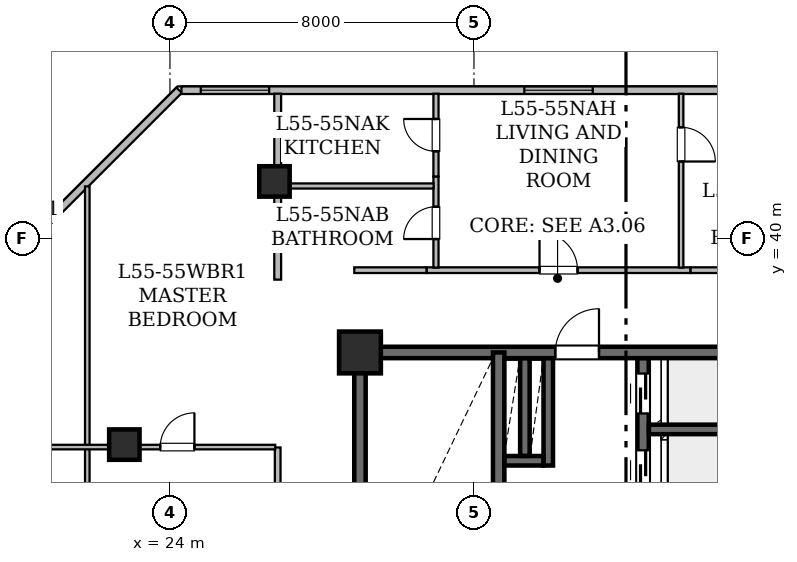
"""IFC4 building model, lengths in metres.
Left out: names, types, materials, properties, quantities, classifications, styles, units other than length and angle.
Written with IfcOpenShell. Run it as: python <this file> out.ifc"""

import sys

from ifc_helpers import new_model, si_unit, direction, frame, frame_2d, origin, origin_2d, place, context, subcontext, project, spatial, rectangle, hollow_rectangle, extrude, element, fill, save


model = new_model("IFC4")
c1 = context("Model", 3, precision=1e-05, world=origin(), true_north=direction((0.0, 1.0)))
c2 = subcontext(c1, "Body", "Model", "MODEL_VIEW")
j1 = project(units=[si_unit("LENGTHUNIT", "METRE"), si_unit("PLANEANGLEUNIT", "RADIAN")], contexts=[c1])
p1 = place(None, origin())
s1 = spatial("IfcSite", under=j1, at=p1, CompositionType="ELEMENT")
p2 = place(p1, origin())
s2 = spatial("IfcBuilding", under=s1, at=p2, CompositionType="ELEMENT")
p3 = place(p2, frame((0.0, 0.0, 217.2)))
s3 = spatial("IfcBuildingStorey", under=s2, at=p3, CompositionType="ELEMENT", Elevation=217.2)
p4 = place(p3, frame((29.0, 37.0, 0.0), z_axis=(0.0, 0.0, 1.0), x_axis=(1.0, 0.0, 0.0)))
e1 = element("IfcColumn", 1, at=p4, inside=s3, PredefinedType="COLUMN", context=c2, shape_type="SweptSolid", body=[
    extrude(hollow_rectangle(XDim=1.1, YDim=1.1, WallThickness=0.055, at=origin_2d()), origin(), (0.0, 0.0, 1.0), 3.65),
])
for number, where, z_axis, x_axis in (
    (2, (26.75, 41.5, 0.025), (0.0, 0.0, 1.0), (1.0, 0.0, 0.0)),
    (3, (22.8, 34.575, 0.025), (0.0, 0.0, 1.0), (1.0, 0.0, 0.0)),
):
    element("IfcColumn", number, at=place(p3, frame(where, z_axis=z_axis, x_axis=x_axis)), inside=s3, PredefinedType="COLUMN", context=c2, shape_type="SweptSolid", body=[
        extrude(hollow_rectangle(XDim=0.8, YDim=0.8, WallThickness=0.04, at=origin_2d()), origin(), (0.0, 0.0, 1.0), 3.625),
    ])
p5 = place(p3, frame((20.344, 40.003, 0.0), z_axis=(0.0, 0.0, 1.0), x_axis=(0.707106781187, 0.707106781187, 0.0)))
e4 = element("IfcWall", 4, at=p5, inside=s3, PredefinedType="STANDARD", context=c2, shape_type="SweptSolid", body=[
    extrude(rectangle(XDim=5.511, YDim=0.2, at=frame_2d((2.756, 0.0))), origin(), (0.0, 0.0, 1.0), 3.43),
])
p6 = place(p3, frame((24.302, 43.9, 0.0), z_axis=(0.0, 0.0, 1.0), x_axis=(1.0, 0.0, 0.0)))
e5 = element("IfcWall", 5, at=p6, inside=s3, PredefinedType="STANDARD", context=c2, shape_type="SweptSolid", body=[
    extrude(rectangle(XDim=41.457, YDim=0.2, at=frame_2d((20.729, 0.0))), origin(), (0.0, 0.0, 1.0), 3.43),
])
p7 = place(p6, frame((0.509, 0.0, 0.85)))
e6 = element("IfcOpeningElement", 6, at=p7, cuts=e5, PredefinedType="OPENING", context=c2, shape_type="SweptSolid", body=[
    extrude(rectangle(XDim=1.8, YDim=0.92, at=frame_2d((0.9, 0.46))), frame((0.0, 0.11, 0.0), z_axis=(0.0, -1.0, 0.0), x_axis=(1.0, 0.0, 0.0)), (0.0, 0.0, 1.0), 0.22),
])
p8 = place(p6, frame((9.023, 0.0, 0.85)))
e7 = element("IfcOpeningElement", 7, at=p8, cuts=e5, PredefinedType="OPENING", context=c2, shape_type="SweptSolid", body=[
    extrude(rectangle(XDim=1.8, YDim=0.92, at=frame_2d((0.9, 0.46))), frame((0.0, 0.11, 0.0), z_axis=(0.0, -1.0, 0.0), x_axis=(1.0, 0.0, 0.0)), (0.0, 0.0, 1.0), 0.22),
])
p9 = place(p6, frame((14.33, 0.0, 0.85)))
e8 = element("IfcOpeningElement", 8, at=p9, cuts=e5, PredefinedType="OPENING", context=c2, shape_type="SweptSolid", body=[
    extrude(rectangle(XDim=1.8, YDim=0.92, at=frame_2d((0.9, 0.46))), frame((0.0, 0.11, 0.0), z_axis=(0.0, -1.0, 0.0), x_axis=(1.0, 0.0, 0.0)), (0.0, 0.0, 1.0), 0.22),
])
p10 = place(p6, frame((30.783, 0.0, 0.78)))
e9 = element("IfcOpeningElement", 9, at=p10, cuts=e5, PredefinedType="OPENING", context=c2, shape_type="SweptSolid", body=[
    extrude(rectangle(XDim=1.2, YDim=1.5, at=frame_2d((0.6, 0.75))), frame((0.0, 0.11, 0.0), z_axis=(0.0, -1.0, 0.0), x_axis=(1.0, 0.0, 0.0)), (0.0, 0.0, 1.0), 0.22),
])
p11 = place(p6, frame((23.056, 0.0, 0.85)))
e10 = element("IfcOpeningElement", 10, at=p11, cuts=e5, PredefinedType="OPENING", context=c2, shape_type="SweptSolid", body=[
    extrude(rectangle(XDim=1.8, YDim=0.92, at=frame_2d((0.9, 0.46))), frame((0.0, 0.11, 0.0), z_axis=(0.0, -1.0, 0.0), x_axis=(1.0, 0.0, 0.0)), (0.0, 0.0, 1.0), 0.22),
])
p12 = place(p6, frame((35.52, 0.0, 0.85)))
e11 = element("IfcOpeningElement", 11, at=p12, cuts=e5, PredefinedType="OPENING", context=c2, shape_type="SweptSolid", body=[
    extrude(rectangle(XDim=1.8, YDim=0.92, at=frame_2d((0.9, 0.46))), frame((0.0, 0.11, 0.0), z_axis=(0.0, -1.0, 0.0), x_axis=(1.0, 0.0, 0.0)), (0.0, 0.0, 1.0), 0.22),
])
p13 = place(p3, frame((29.0, 28.0, 0.0), z_axis=(0.0, 0.0, 1.0), x_axis=(0.0, 1.0, 0.0)))
e12 = element("IfcWall", 12, at=p13, inside=s3, PredefinedType="SHEAR", context=c2, shape_type="SweptSolid", body=[
    extrude(rectangle(XDim=9.0, YDim=0.3, at=frame_2d((4.5, 0.0))), origin(), (0.0, 0.0, 1.0), 3.43),
])
p14 = place(p3, frame((29.0, 37.0, 0.0), z_axis=(0.0, 0.0, 1.0), x_axis=(1.0, 0.0, 0.0)))
e13 = element("IfcWall", 13, at=p14, inside=s3, PredefinedType="SHEAR", context=c2, shape_type="SweptSolid", body=[
    extrude(rectangle(XDim=10.4, YDim=0.3, at=frame_2d((5.2, 0.0))), origin(), (0.0, 0.0, 1.0), 3.43),
])
p15 = place(p14, frame((5.14, 0.0, 0.0)))
e14 = element("IfcOpeningElement", 14, at=p15, cuts=e13, PredefinedType="OPENING", context=c2, shape_type="SweptSolid", body=[
    extrude(rectangle(XDim=1.15, YDim=2.2, at=frame_2d((0.575, 1.1))), frame((0.0, 0.16, 0.0), z_axis=(0.0, -1.0, 0.0), x_axis=(1.0, 0.0, 0.0)), (0.0, 0.0, 1.0), 0.32),
])
p16 = place(p3, frame((32.65, 28.0, 0.0), z_axis=(0.0, 0.0, 1.0), x_axis=(0.0, 1.0, 0.0)))
e15 = element("IfcWall", 15, at=p16, inside=s3, PredefinedType="SHEAR", context=c2, shape_type="SweptSolid", body=[
    extrude(rectangle(XDim=9.0, YDim=0.3, at=frame_2d((4.5, 0.0))), origin(), (0.0, 0.0, 1.0), 3.43),
])
p17 = place(p16, frame((0.72, 0.0, 0.0)))
e16 = element("IfcOpeningElement", 16, at=p17, cuts=e15, PredefinedType="OPENING", context=c2, shape_type="SweptSolid", body=[
    extrude(rectangle(XDim=1.0, YDim=2.15, at=frame_2d((0.5, 1.075))), frame((0.0, 0.16, 0.0), z_axis=(0.0, -1.0, 0.0), x_axis=(1.0, 0.0, 0.0)), (0.0, 0.0, 1.0), 0.32),
])
p18 = place(p3, frame((36.45, 31.3, 0.0), z_axis=(0.0, 0.0, 1.0), x_axis=(0.0, 1.0, 0.0)))
e17 = element("IfcWall", 17, at=p18, inside=s3, PredefinedType="SHEAR", context=c2, shape_type="SweptSolid", body=[
    extrude(rectangle(XDim=5.546, YDim=0.3, at=frame_2d((2.773, 0.0))), origin(), (0.0, 0.0, 1.0), 3.43),
])
p19 = place(p18, frame((0.12, 0.0, 0.0)))
e18 = element("IfcOpeningElement", 18, at=p19, cuts=e17, PredefinedType="OPENING", context=c2, shape_type="SweptSolid", body=[
    extrude(rectangle(XDim=1.05, YDim=2.15, at=frame_2d((0.525, 1.075))), frame((0.0, 0.16, 0.0), z_axis=(0.0, -1.0, 0.0), x_axis=(1.0, 0.0, 0.0)), (0.0, 0.0, 1.0), 0.32),
])
p20 = place(p18, frame((2.075, 0.0, 0.0)))
e19 = element("IfcOpeningElement", 19, at=p20, cuts=e17, PredefinedType="OPENING", context=c2, shape_type="SweptSolid", body=[
    extrude(rectangle(XDim=1.05, YDim=2.15, at=frame_2d((0.525, 1.075))), frame((0.0, 0.16, 0.0), z_axis=(0.0, -1.0, 0.0), x_axis=(1.0, 0.0, 0.0)), (0.0, 0.0, 1.0), 0.32),
])
p21 = place(p18, frame((4.095, 0.0, 0.0)))
e20 = element("IfcOpeningElement", 20, at=p21, cuts=e17, PredefinedType="OPENING", context=c2, shape_type="SweptSolid", body=[
    extrude(rectangle(XDim=1.05, YDim=2.15, at=frame_2d((0.525, 1.075))), frame((0.0, 0.16, 0.0), z_axis=(0.0, -1.0, 0.0), x_axis=(1.0, 0.0, 0.0)), (0.0, 0.0, 1.0), 0.32),
])
p22 = place(p3, frame((36.604, 34.975, 0.0), z_axis=(0.0, 0.0, 1.0), x_axis=(1.0, 0.0, 0.0)))
e21 = element("IfcWall", 21, at=p22, inside=s3, PredefinedType="SHEAR", context=c2, shape_type="SweptSolid", body=[
    extrude(rectangle(XDim=2.642, YDim=0.25, at=frame_2d((1.321, 0.0))), origin(), (0.0, 0.0, 1.0), 3.43),
])
p23 = place(p3, frame((33.955, 34.025, 0.0), z_axis=(0.0, 0.0, 1.0), x_axis=(0.0, 1.0, 0.0)))
e22 = element("IfcWall", 22, at=p23, inside=s3, PredefinedType="SHEAR", context=c2, shape_type="SweptSolid", body=[
    extrude(rectangle(XDim=2.821, YDim=0.25, at=frame_2d((1.411, 0.0))), origin(), (0.0, 0.0, 1.0), 3.43),
])
p24 = place(p3, frame((32.804, 34.15, 0.0), z_axis=(0.0, 0.0, 1.0), x_axis=(1.0, 0.0, 0.0)))
e23 = element("IfcWall", 23, at=p24, inside=s3, PredefinedType="SHEAR", context=c2, shape_type="SweptSolid", body=[
    extrude(rectangle(XDim=1.022, YDim=0.25, at=frame_2d((0.511, 0.0))), origin(), (0.0, 0.0, 1.0), 3.43),
])
p25 = place(p3, frame((33.34, 34.279, 0.0), z_axis=(0.0, 0.0, 1.0), x_axis=(0.0, 1.0, 0.0)))
e24 = element("IfcWall", 24, at=p25, inside=s3, PredefinedType="SHEAR", context=c2, shape_type="SweptSolid", body=[
    extrude(rectangle(XDim=2.567, YDim=0.25, at=frame_2d((1.283, 0.0))), origin(), (0.0, 0.0, 1.0), 3.43),
])
p26 = place(p3, frame((26.835, 32.681, 0.0), z_axis=(0.0, 0.0, 1.0), x_axis=(0.0, 1.0, 0.0)))
e25 = element("IfcWall", 25, at=p26, inside=s3, PredefinedType="STANDARD", context=c2, shape_type="SweptSolid", body=[
    extrude(rectangle(XDim=1.819, YDim=0.15, at=frame_2d((0.91, 0.0))), origin(), (0.0, 0.0, 1.0), 3.065),
])
p27 = place(p3, frame((30.751, 39.165, 0.0), z_axis=(0.0, 0.0, 1.0), x_axis=(1.0, 0.0, 0.0)))
e26 = element("IfcWall", 26, at=p27, inside=s3, PredefinedType="STANDARD", context=c2, shape_type="SweptSolid", body=[
    extrude(rectangle(XDim=6.948, YDim=0.15, at=frame_2d((3.474, 0.0))), origin(), (0.0, 0.0, 1.0), 3.43),
])
p28 = place(p27, frame((2.974, 0.0, 0.0)))
e27 = element("IfcOpeningElement", 27, at=p28, cuts=e26, PredefinedType="OPENING", context=c2, shape_type="SweptSolid", body=[
    extrude(rectangle(XDim=1.0, YDim=2.15, at=frame_2d((0.5, 1.075))), frame((0.0, 0.085, 0.0), z_axis=(0.0, -1.0, 0.0), x_axis=(1.0, 0.0, 0.0)), (0.0, 0.0, 1.0), 0.17),
])
p29 = place(p3, frame((28.85, 39.165, 0.0), z_axis=(0.0, 0.0, 1.0), x_axis=(1.0, 0.0, 0.0)))
e28 = element("IfcWall", 28, at=p29, inside=s3, PredefinedType="STANDARD", context=c2, shape_type="SweptSolid", body=[
    extrude(rectangle(XDim=1.901, YDim=0.15, at=frame_2d((0.95, 0.0))), origin(), (0.0, 0.0, 1.0), 3.43),
])
p30 = place(p3, frame((37.699, 39.165, 0.0), z_axis=(0.0, 0.0, 1.0), x_axis=(1.0, 0.0, 0.0)))
e29 = element("IfcWall", 29, at=p30, inside=s3, PredefinedType="STANDARD", context=c2, shape_type="SweptSolid", body=[
    extrude(rectangle(XDim=3.851, YDim=0.15, at=frame_2d((1.926, 0.0))), origin(), (0.0, 0.0, 1.0), 2.725),
])
p31 = place(p3, frame((21.825, 41.369, 0.0), z_axis=(0.0, 0.0, 1.0), x_axis=(0.0, -1.0, 0.0)))
e30 = element("IfcWall", 30, at=p31, inside=s3, PredefinedType="PARTITIONING", context=c2, shape_type="SweptSolid", body=[
    extrude(rectangle(XDim=9.524, YDim=0.12, at=frame_2d((4.762, 0.0))), origin(), (0.0, 0.0, 1.0), 3.43),
])
p32 = place(p3, frame((20.392, 34.51, 0.0), z_axis=(0.0, 0.0, 1.0), x_axis=(1.0, 0.0, 0.0)))
e31 = element("IfcWall", 31, at=p32, inside=s3, PredefinedType="PARTITIONING", context=c2, shape_type="SweptSolid", body=[
    extrude(rectangle(XDim=6.378, YDim=0.12, at=frame_2d((3.189, 0.0))), origin(), (0.0, 0.0, 1.0), 2.725),
])
p33 = place(p32, frame((3.352, 0.0, 0.0)))
e32 = element("IfcOpeningElement", 32, at=p33, cuts=e31, PredefinedType="OPENING", context=c2, shape_type="SweptSolid", body=[
    extrude(rectangle(XDim=0.9, YDim=2.1, at=frame_2d((0.45, 1.05))), frame((0.0, 0.07, 0.0), z_axis=(0.0, -1.0, 0.0), x_axis=(1.0, 0.0, 0.0)), (0.0, 0.0, 1.0), 0.14),
])
p34 = place(p3, frame((26.835, 41.629, 0.0), z_axis=(0.0, 0.0, 1.0), x_axis=(0.0, -1.0, 0.0)))
e33 = element("IfcWall", 33, at=p34, inside=s3, PredefinedType="STANDARD", context=c2, shape_type="SweptSolid", body=[
    extrude(rectangle(XDim=2.713, YDim=0.18, at=frame_2d((1.356, 0.0))), origin(), (0.0, 0.0, 1.0), 2.725),
])
p35 = place(p3, frame((26.835, 43.808, 0.0), z_axis=(0.0, 0.0, 1.0), x_axis=(0.0, -1.0, 0.0)))
e34 = element("IfcWall", 34, at=p35, inside=s3, PredefinedType="STANDARD", context=c2, shape_type="SweptSolid", body=[
    extrude(rectangle(XDim=2.179, YDim=0.18, at=frame_2d((1.09, 0.0))), origin(), (0.0, 0.0, 1.0), 2.725),
])
p36 = place(p3, frame((31.0, 39.232, 0.0), z_axis=(0.0, 0.0, 1.0), x_axis=(0.0, 1.0, 0.0)))
e35 = element("IfcWall", 35, at=p36, inside=s3, PredefinedType="PARTITIONING", context=c2, shape_type="SweptSolid", body=[
    extrude(rectangle(XDim=2.397, YDim=0.135, at=frame_2d((1.198, 0.0))), origin(), (0.0, 0.0, 1.0), 2.887),
])
p37 = place(p36, frame((0.752, 0.0, 0.0)))
e36 = element("IfcOpeningElement", 36, at=p37, cuts=e35, PredefinedType="OPENING", context=c2, shape_type="SweptSolid", body=[
    extrude(rectangle(XDim=0.85, YDim=2.1, at=frame_2d((0.425, 1.05))), frame((0.0, 0.077, 0.0), z_axis=(0.0, -1.0, 0.0), x_axis=(1.0, 0.0, 0.0)), (0.0, 0.0, 1.0), 0.155),
])
p38 = place(p3, frame((31.0, 41.629, 0.0), z_axis=(0.0, 0.0, 1.0), x_axis=(0.0, 1.0, 0.0)))
e37 = element("IfcWall", 37, at=p38, inside=s3, PredefinedType="PARTITIONING", context=c2, shape_type="SweptSolid", body=[
    extrude(rectangle(XDim=2.179, YDim=0.135, at=frame_2d((1.09, 0.0))), origin(), (0.0, 0.0, 1.0), 3.43),
])
p39 = place(p38, frame((0.664, 0.0, 0.0)))
e38 = element("IfcOpeningElement", 38, at=p39, cuts=e37, PredefinedType="OPENING", context=c2, shape_type="SweptSolid", body=[
    extrude(rectangle(XDim=0.85, YDim=2.1, at=frame_2d((0.425, 1.05))), frame((0.0, 0.077, 0.0), z_axis=(0.0, -1.0, 0.0), x_axis=(1.0, 0.0, 0.0)), (0.0, 0.0, 1.0), 0.155),
])
p40 = place(p3, frame((37.45, 43.808, 0.0), z_axis=(0.0, 0.0, 1.0), x_axis=(0.0, -1.0, 0.0)))
e39 = element("IfcWall", 39, at=p40, inside=s3, PredefinedType="PARTITIONING", context=c2, shape_type="SweptSolid", body=[
    extrude(rectangle(XDim=4.576, YDim=0.12, at=frame_2d((2.288, 0.0))), origin(), (0.0, 0.0, 1.0), 2.887),
])
p41 = place(p40, frame((0.884, 0.0, 0.0)))
e40 = element("IfcOpeningElement", 40, at=p41, cuts=e39, PredefinedType="OPENING", context=c2, shape_type="SweptSolid", body=[
    extrude(rectangle(XDim=0.9, YDim=2.1, at=frame_2d((0.45, 1.05))), frame((0.0, 0.07, 0.0), z_axis=(0.0, -1.0, 0.0), x_axis=(1.0, 0.0, 0.0)), (0.0, 0.0, 1.0), 0.14),
])
p42 = place(p3, frame((26.917, 41.38, 0.0), z_axis=(0.0, 0.0, 1.0), x_axis=(1.0, 0.0, 0.0)))
e41 = element("IfcWall", 41, at=p42, inside=s3, PredefinedType="PARTITIONING", context=c2, shape_type="SweptSolid", body=[
    extrude(rectangle(XDim=4.022, YDim=0.135, at=frame_2d((2.011, 0.0))), origin(), (0.0, 0.0, 1.0), 2.725),
])
p43 = place(p7, origin())
e42 = element("IfcWindow", 42, at=p43, inside=s3, PartitioningType="SINGLE_PANEL", PredefinedType="WINDOW", context=c2, shape_type="SweptSolid", body=[
    extrude(rectangle(XDim=1.8, YDim=0.92, at=frame_2d((0.9, 0.46))), frame((0.0, 0.03, 0.0), z_axis=(0.0, -1.0, 0.0), x_axis=(1.0, 0.0, 0.0)), (0.0, 0.0, 1.0), 0.06),
])
fill(e6, e42)
p44 = place(p8, origin())
e43 = element("IfcWindow", 43, at=p44, inside=s3, PartitioningType="SINGLE_PANEL", PredefinedType="WINDOW", context=c2, shape_type="SweptSolid", body=[
    extrude(rectangle(XDim=1.8, YDim=0.92, at=frame_2d((0.9, 0.46))), frame((0.0, 0.03, 0.0), z_axis=(0.0, -1.0, 0.0), x_axis=(1.0, 0.0, 0.0)), (0.0, 0.0, 1.0), 0.06),
])
fill(e7, e43)
p45 = place(p15, origin())
e44 = element("IfcDoor", 44, at=p45, inside=s3, OperationType="SINGLE_SWING_RIGHT", PredefinedType="DOOR", context=c2, shape_type="SweptSolid", body=[
    extrude(rectangle(XDim=1.15, YDim=2.2, at=frame_2d((0.575, 1.1))), frame((0.0, 0.025, 0.0), z_axis=(0.0, -1.0, 0.0), x_axis=(1.0, 0.0, 0.0)), (0.0, 0.0, 1.0), 0.05),
])
fill(e14, e44)
p46 = place(p20, origin())
e45 = element("IfcDoor", 45, at=p46, inside=s3, OperationType="SLIDING_TO_LEFT", PredefinedType="DOOR", context=c2, shape_type="SweptSolid", body=[
    extrude(rectangle(XDim=1.05, YDim=2.15, at=frame_2d((0.525, 1.075))), frame((0.0, 0.025, 0.0), z_axis=(0.0, -1.0, 0.0), x_axis=(1.0, 0.0, 0.0)), (0.0, 0.0, 1.0), 0.05),
])
fill(e19, e45)
p47 = place(p21, origin())
e46 = element("IfcDoor", 46, at=p47, inside=s3, OperationType="SLIDING_TO_LEFT", PredefinedType="DOOR", context=c2, shape_type="SweptSolid", body=[
    extrude(rectangle(XDim=1.05, YDim=2.15, at=frame_2d((0.525, 1.075))), frame((0.0, 0.025, 0.0), z_axis=(0.0, -1.0, 0.0), x_axis=(1.0, 0.0, 0.0)), (0.0, 0.0, 1.0), 0.05),
])
fill(e20, e46)
p48 = place(p28, origin())
e47 = element("IfcDoor", 47, at=p48, inside=s3, OperationType="SINGLE_SWING_LEFT", PredefinedType="DOOR", context=c2, shape_type="SweptSolid", body=[
    extrude(rectangle(XDim=1.0, YDim=2.15, at=frame_2d((0.5, 1.075))), frame((0.0, 0.025, 0.0), z_axis=(0.0, -1.0, 0.0), x_axis=(1.0, 0.0, 0.0)), (0.0, 0.0, 1.0), 0.05),
])
fill(e27, e47)
p49 = place(p33, origin())
e48 = element("IfcDoor", 48, at=p49, inside=s3, OperationType="SINGLE_SWING_RIGHT", PredefinedType="DOOR", context=c2, shape_type="SweptSolid", body=[
    extrude(rectangle(XDim=0.9, YDim=2.1, at=frame_2d((0.45, 1.05))), frame((0.0, 0.025, 0.0), z_axis=(0.0, -1.0, 0.0), x_axis=(1.0, 0.0, 0.0)), (0.0, 0.0, 1.0), 0.05),
])
fill(e32, e48)
p50 = place(p37, origin())
e49 = element("IfcDoor", 49, at=p50, inside=s3, OperationType="SINGLE_SWING_LEFT", PredefinedType="DOOR", context=c2, shape_type="SweptSolid", body=[
    extrude(rectangle(XDim=0.85, YDim=2.1, at=frame_2d((0.425, 1.05))), frame((0.0, 0.025, 0.0), z_axis=(0.0, -1.0, 0.0), x_axis=(1.0, 0.0, 0.0)), (0.0, 0.0, 1.0), 0.05),
])
fill(e36, e49)
p51 = place(p39, origin())
e50 = element("IfcDoor", 50, at=p51, inside=s3, OperationType="SINGLE_SWING_RIGHT", PredefinedType="DOOR", context=c2, shape_type="SweptSolid", body=[
    extrude(rectangle(XDim=0.85, YDim=2.1, at=frame_2d((0.425, 1.05))), frame((0.0, 0.025, 0.0), z_axis=(0.0, -1.0, 0.0), x_axis=(1.0, 0.0, 0.0)), (0.0, 0.0, 1.0), 0.05),
])
fill(e38, e50)
p52 = place(p41, origin())
e51 = element("IfcDoor", 51, at=p52, inside=s3, OperationType="SINGLE_SWING_RIGHT", PredefinedType="DOOR", context=c2, shape_type="SweptSolid", body=[
    extrude(rectangle(XDim=0.9, YDim=2.1, at=frame_2d((0.45, 1.05))), frame((0.0, 0.025, 0.0), z_axis=(0.0, -1.0, 0.0), x_axis=(1.0, 0.0, 0.0)), (0.0, 0.0, 1.0), 0.05),
])
fill(e40, e51)
save(model, sys.argv[1])
